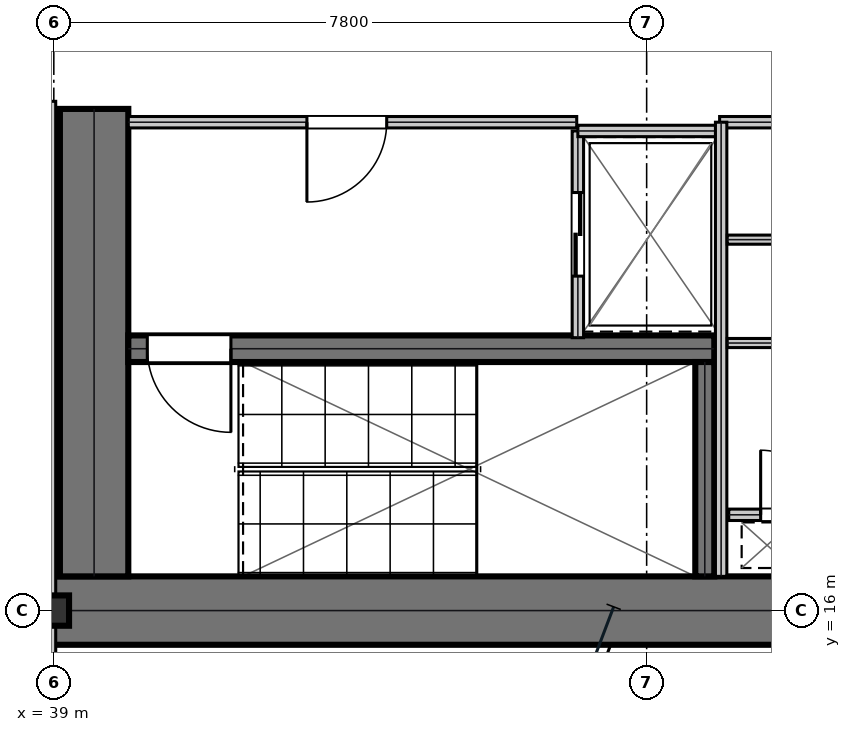
"""IFC4 building model, lengths in metres.
Left out: names, types, materials, properties, quantities, classifications, styles, units other than length and angle.
Written with IfcOpenShell. Run it as: python <this file> out.ifc"""

import sys

from ifc_helpers import new_model, si_unit, direction, frame, frame_2d, origin, origin_2d, place, context, subcontext, project, spatial, rectangle, i_section, extrude, element, fill, save


model = new_model("IFC4")
c1 = context("Model", 3, precision=1e-05, world=origin(), true_north=direction((0.0, 1.0)))
c2 = subcontext(c1, "Body", "Model", "MODEL_VIEW")
j1 = project(units=[si_unit("LENGTHUNIT", "METRE"), si_unit("PLANEANGLEUNIT", "RADIAN")], contexts=[c1])
p1 = place(None, origin())
s1 = spatial("IfcSite", under=j1, at=p1, CompositionType="ELEMENT")
p2 = place(p1, origin())
s2 = spatial("IfcBuilding", under=s1, at=p2, CompositionType="ELEMENT")
p3 = place(p2, frame((0.0, 0.0, 45.9)))
s3 = spatial("IfcBuildingStorey", under=s2, at=p3, CompositionType="ELEMENT", Elevation=45.9)
p4 = place(p3, frame((38.8, 16.0, 0.0), z_axis=(0.0, 0.0, 1.0), x_axis=(1.0, 0.0, 0.0)))
e1 = element("IfcWall", 1, at=p4, inside=s3, PredefinedType="SHEAR", context=c2, shape_type="SweptSolid", body=[
    extrude(rectangle(XDim=16.0, YDim=0.9, at=frame_2d((8.0, 0.0))), origin(), (0.0, 0.0, 1.0), 3.81),
])
p5 = place(p3, frame((39.53, 16.45, 0.0), z_axis=(0.0, 0.0, 1.0), x_axis=(0.0, 1.0, 0.0)))
e2 = element("IfcWall", 2, at=p5, inside=s3, PredefinedType="SHEAR", context=c2, shape_type="SweptSolid", body=[
    extrude(rectangle(XDim=6.15, YDim=0.9, at=frame_2d((3.075, 0.0))), origin(), (0.0, 0.0, 1.0), 3.81),
])
p6 = place(p3, frame((39.98, 19.445, 0.0), z_axis=(0.0, 0.0, 1.0), x_axis=(1.0, 0.0, 0.0)))
e3 = element("IfcWall", 3, at=p6, inside=s3, PredefinedType="SHEAR", context=c2, shape_type="SweptSolid", body=[
    extrude(rectangle(XDim=7.71, YDim=0.35, at=frame_2d((3.855, 0.0))), origin(), (0.0, 0.0, 1.0), 3.81),
])
p7 = place(p6, frame((0.25, 0.0, 0.0)))
e4 = element("IfcOpeningElement", 4, at=p7, cuts=e3, PredefinedType="OPENING", context=c2, shape_type="SweptSolid", body=[
    extrude(rectangle(XDim=1.1, YDim=2.15, at=frame_2d((0.55, 1.075))), frame((0.0, 0.185, 0.0), z_axis=(0.0, -1.0, 0.0), x_axis=(1.0, 0.0, 0.0)), (0.0, 0.0, 1.0), 0.37),
])
p8 = place(p3, frame((47.565, 16.45, 0.0), z_axis=(0.0, 0.0, 1.0), x_axis=(0.0, 1.0, 0.0)))
e5 = element("IfcWall", 5, at=p8, inside=s3, PredefinedType="SHEAR", context=c2, shape_type="SweptSolid", body=[
    extrude(rectangle(XDim=2.82, YDim=0.25, at=frame_2d((1.41, 0.0))), origin(), (0.0, 0.0, 1.0), 3.81),
])
p9 = place(p3, frame((39.0, 16.0, 0.0), z_axis=(0.0, 0.0, 1.0), x_axis=(1.0, 0.0, 0.0)))
e6 = element("IfcColumn", 6, at=p9, inside=s3, PredefinedType="COLUMN", context=c2, shape_type="SweptSolid", body=[
    extrude(i_section(OverallWidth=0.401, OverallDepth=0.399, WebThickness=0.025, FlangeThickness=0.04, at=origin_2d()), origin(), (0.0, 0.0, 1.0), 4.044),
])
p10 = place(p3, frame((39.98, 22.425, 0.0), z_axis=(0.0, 0.0, 1.0), x_axis=(1.0, 0.0, 0.0)))
e7 = element("IfcWall", 7, at=p10, inside=s3, PredefinedType="PARTITIONING", context=c2, shape_type="SweptSolid", body=[
    extrude(rectangle(XDim=5.9, YDim=0.15, at=frame_2d((2.95, 0.0))), origin(), (0.0, 0.0, 1.0), 3.81),
])
p11 = place(p10, frame((2.35, 0.0, 0.0)))
e8 = element("IfcOpeningElement", 8, at=p11, cuts=e7, PredefinedType="OPENING", context=c2, shape_type="SweptSolid", body=[
    extrude(rectangle(XDim=1.05, YDim=2.15, at=frame_2d((0.525, 1.075))), frame((0.0, 0.085, 0.0), z_axis=(0.0, -1.0, 0.0), x_axis=(1.0, 0.0, 0.0)), (0.0, 0.0, 1.0), 0.17),
])
p12 = place(p3, frame((45.895, 19.59, 0.0), z_axis=(0.0, 0.0, 1.0), x_axis=(0.0, 1.0, 0.0)))
e9 = element("IfcWall", 9, at=p12, inside=s3, PredefinedType="PARTITIONING", context=c2, shape_type="SweptSolid", body=[
    extrude(rectangle(XDim=2.72, YDim=0.15, at=frame_2d((1.36, 0.0))), origin(), (0.0, 0.0, 1.0), 3.81),
])
p13 = place(p12, frame((0.81, 0.0, 0.0)))
e10 = element("IfcOpeningElement", 10, at=p13, cuts=e9, PredefinedType="OPENING", context=c2, shape_type="SweptSolid", body=[
    extrude(rectangle(XDim=1.1, YDim=2.15, at=frame_2d((0.55, 1.075))), frame((0.0, 0.085, 0.0), z_axis=(0.0, -1.0, 0.0), x_axis=(1.0, 0.0, 0.0)), (0.0, 0.0, 1.0), 0.17),
])
p14 = place(p3, frame((45.895, 22.31, 0.0), z_axis=(0.0, 0.0, 1.0), x_axis=(1.0, 0.0, 0.0)))
e11 = element("IfcWall", 11, at=p14, inside=s3, PredefinedType="PARTITIONING", context=c2, shape_type="SweptSolid", body=[
    extrude(rectangle(XDim=1.915, YDim=0.15, at=frame_2d((0.958, 0.0))), origin(), (0.0, 0.0, 1.0), 3.81),
])
p15 = place(p3, frame((47.88, 17.26, 0.0), z_axis=(0.0, 0.0, 1.0), x_axis=(1.0, 0.0, 0.0)))
e12 = element("IfcWall", 12, at=p15, inside=s3, PredefinedType="PARTITIONING", context=c2, shape_type="SweptSolid", body=[
    extrude(rectangle(XDim=1.72, YDim=0.15, at=frame_2d((0.86, 0.0))), origin(), (0.0, 0.0, 1.0), 3.81),
])
p16 = place(p15, frame((0.42, 0.0, 0.0)))
e13 = element("IfcOpeningElement", 13, at=p16, cuts=e12, PredefinedType="OPENING", context=c2, shape_type="SweptSolid", body=[
    extrude(rectangle(XDim=0.85, YDim=2.15, at=frame_2d((0.425, 1.075))), frame((0.0, 0.085, 0.0), z_axis=(0.0, -1.0, 0.0), x_axis=(1.0, 0.0, 0.0)), (0.0, 0.0, 1.0), 0.17),
])
p17 = place(p3, frame((47.76, 22.425, 0.0), z_axis=(0.0, 0.0, 1.0), x_axis=(1.0, 0.0, 0.0)))
e14 = element("IfcWall", 14, at=p17, inside=s3, PredefinedType="PARTITIONING", context=c2, shape_type="SweptSolid", body=[
    extrude(rectangle(XDim=1.96, YDim=0.15, at=frame_2d((0.98, 0.0))), origin(), (0.0, 0.0, 1.0), 3.81),
])
p18 = place(p3, frame((47.78, 16.45, 0.0), z_axis=(0.0, 0.0, 1.0), x_axis=(0.0, 1.0, 0.0)))
e15 = element("IfcWall", 15, at=p18, inside=s3, PredefinedType="PARTITIONING", context=c2, shape_type="SweptSolid", body=[
    extrude(rectangle(XDim=5.975, YDim=0.15, at=frame_2d((2.988, 0.0))), origin(), (0.0, 0.0, 1.0), 3.81),
])
for number, where, z_axis, x_axis in (
    (16, (47.86, 19.52, 0.0), (0.0, 0.0, 1.0), (1.0, 0.0, 0.0)),
    (17, (47.86, 20.88, 0.0), (0.0, 0.0, 1.0), (1.0, 0.0, 0.0)),
):
    element("IfcWall", number, at=place(p3, frame(where, z_axis=z_axis, x_axis=x_axis)), inside=s3, PredefinedType="PARTITIONING", context=c2, shape_type="SweptSolid", body=[
        extrude(rectangle(XDim=1.76, YDim=0.12, at=frame_2d((0.88, 0.0))), origin(), (0.0, 0.0, 1.0), 3.81),
    ])
p19 = place(p3, frame((38.95, 14.5, 0.0), z_axis=(0.0, 0.0, 1.0), x_axis=(0.0, 1.0, 0.0)))
e18 = element("IfcWall", 18, at=p19, inside=s3, PredefinedType="PARTITIONING", context=c2, shape_type="SweptSolid", body=[
    extrude(rectangle(XDim=8.2, YDim=0.15, at=frame_2d((4.1, 0.0))), origin(), (0.0, 0.0, 1.0), 3.181),
])
p20 = place(p11, frame((1.05, 0.0, 0.0), z_axis=(0.0, 0.0, 1.0), x_axis=(-1.0, 0.0, 0.0)))
e19 = element("IfcDoor", 19, at=p20, inside=s3, OperationType="SINGLE_SWING_RIGHT", PredefinedType="DOOR", context=c2, shape_type="SweptSolid", body=[
    extrude(rectangle(XDim=1.05, YDim=2.15, at=frame_2d((0.525, 1.075))), frame((0.0, 0.025, 0.0), z_axis=(0.0, -1.0, 0.0), x_axis=(1.0, 0.0, 0.0)), (0.0, 0.0, 1.0), 0.05),
])
fill(e8, e19)
p21 = place(p13, frame((1.1, 0.0, 0.0), z_axis=(0.0, 0.0, 1.0), x_axis=(-1.0, 0.0, 0.0)))
e20 = element("IfcDoor", 20, at=p21, inside=s3, OperationType="DOUBLE_DOOR_SLIDING", PredefinedType="DOOR", context=c2, shape_type="SweptSolid", body=[
    extrude(rectangle(XDim=1.1, YDim=2.15, at=frame_2d((0.55, 1.075))), frame((0.0, 0.025, 0.0), z_axis=(0.0, -1.0, 0.0), x_axis=(1.0, 0.0, 0.0)), (0.0, 0.0, 1.0), 0.05),
])
fill(e10, e20)
p22 = place(p16, origin())
e21 = element("IfcDoor", 21, at=p22, inside=s3, OperationType="SINGLE_SWING_LEFT", PredefinedType="TRAPDOOR", context=c2, shape_type="SweptSolid", body=[
    extrude(rectangle(XDim=0.85, YDim=2.15, at=frame_2d((0.425, 1.075))), frame((0.0, 0.025, 0.0), z_axis=(0.0, -1.0, 0.0), x_axis=(1.0, 0.0, 0.0)), (0.0, 0.0, 1.0), 0.05),
])
fill(e13, e21)
p23 = place(p7, frame((1.1, 0.0, 0.0), z_axis=(0.0, 0.0, 1.0), x_axis=(-1.0, 0.0, 0.0)))
e22 = element("IfcDoor", 22, at=p23, inside=s3, OperationType="SINGLE_SWING_LEFT", PredefinedType="DOOR", context=c2, shape_type="SweptSolid", body=[
    extrude(rectangle(XDim=1.1, YDim=2.15, at=frame_2d((0.55, 1.075))), frame((0.0, 0.025, 0.0), z_axis=(0.0, -1.0, 0.0), x_axis=(1.0, 0.0, 0.0)), (0.0, 0.0, 1.0), 0.05),
])
fill(e4, e22)
save(model, sys.argv[1])
